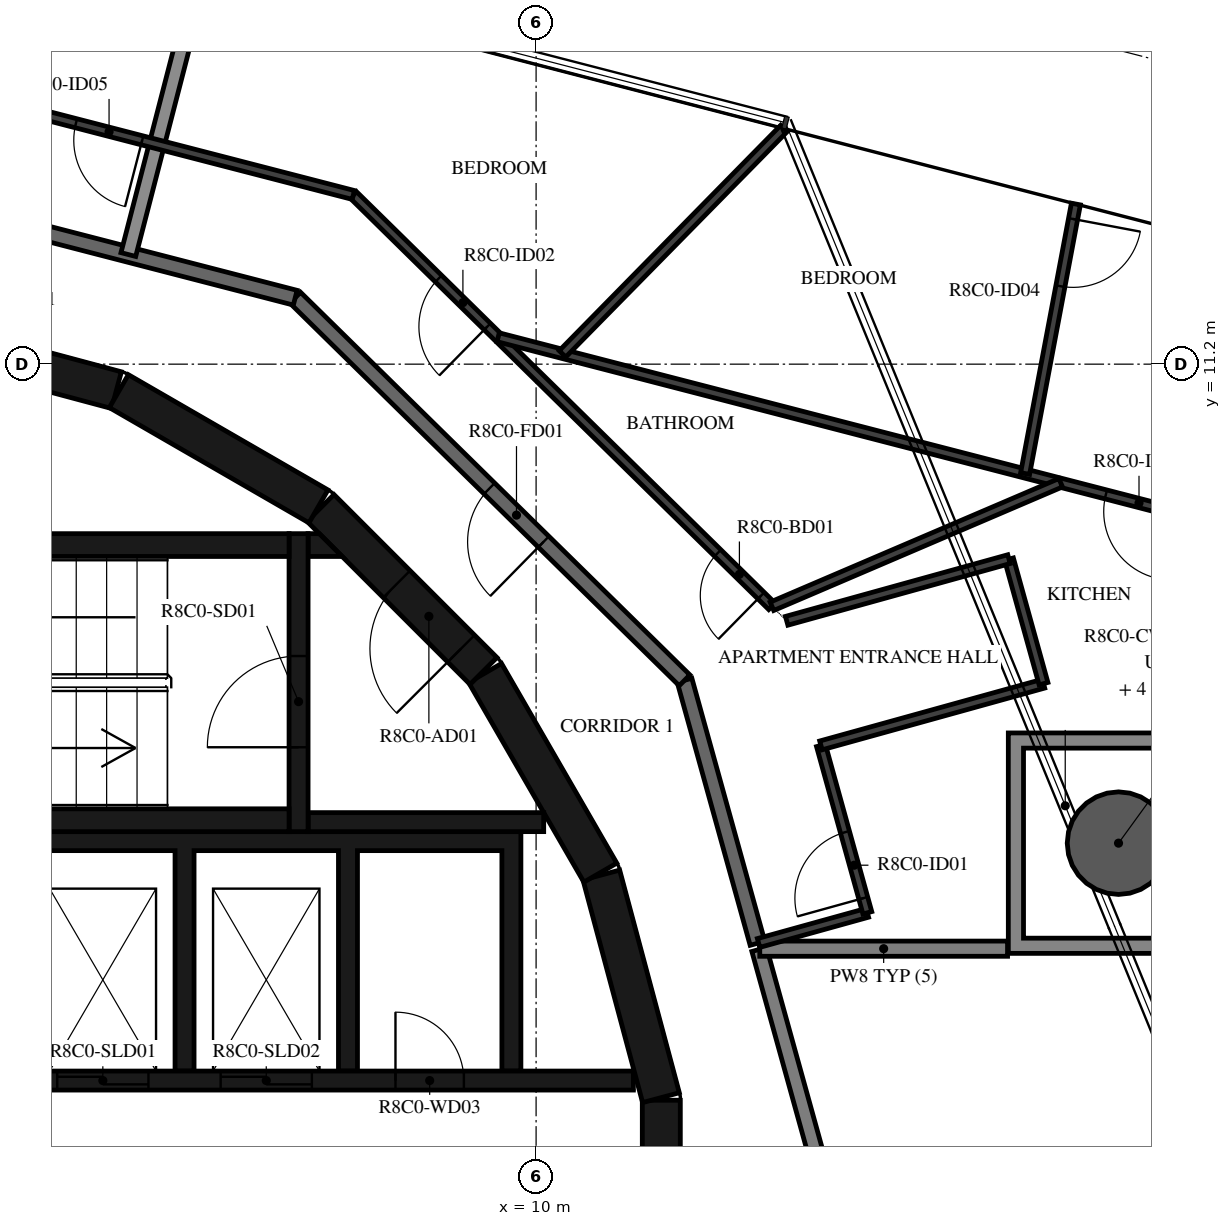
"""IFC4 building model, lengths in metres.
Left out: names, types, materials, properties, quantities, classifications, styles, units other than length and angle.
Written with IfcOpenShell. Run it as: python <this file> out.ifc"""

import sys

from ifc_helpers import new_model, si_unit, direction, frame, frame_2d, origin, origin_2d, place, context, subcontext, project, spatial, polyline, rectangle, hollow_circle, outline, extrude, element, fill, save


model = new_model("IFC4")
c1 = context("Model", 3, precision=1e-05, world=origin(), true_north=direction((0.0, 1.0)))
c2 = subcontext(c1, "Body", "Model", "MODEL_VIEW")
j1 = project(units=[si_unit("LENGTHUNIT", "METRE"), si_unit("PLANEANGLEUNIT", "RADIAN")], contexts=[c1])
p1 = place(None, origin())
s1 = spatial("IfcSite", under=j1, at=p1, CompositionType="ELEMENT")
p2 = place(p1, origin())
s2 = spatial("IfcBuilding", under=s1, at=p2, CompositionType="ELEMENT")
p3 = place(p2, frame((0.0, 0.0, 319.2)))
s3 = spatial("IfcBuildingStorey", under=s2, at=p3, CompositionType="ELEMENT", Elevation=319.2)
p4 = place(p3, frame((17.663, 4.898, -0.38), z_axis=(0.0, 0.0, 1.0), x_axis=(1.0, 0.0, 0.0)))
e1 = element("IfcColumn", 1, at=p4, inside=s3, PredefinedType="COLUMN", context=c2, shape_type="SweptSolid", body=[
    extrude(hollow_circle(Radius=0.675, WallThickness=0.03, at=origin_2d()), origin(), (0.0, 0.0, 1.0), 3.5),
])
p5 = place(p3, frame((11.647, -1.516, 0.0), z_axis=(0.0, 0.0, 1.0), x_axis=(0.0, 1.0, 0.0)))
e2 = element("IfcWall", 2, at=p5, inside=s3, PredefinedType="SHEAR", context=c2, shape_type="SweptSolid", body=[
    extrude(rectangle(XDim=3.033, YDim=0.5, at=frame_2d((1.516, 0.0))), origin(), (0.0, 0.0, 1.0), 3.12),
])
p6 = place(p5, frame((0.616, 0.0, 0.0)))
e3 = element("IfcOpeningElement", 3, at=p6, cuts=e2, PredefinedType="OPENING", context=c2, shape_type="SweptSolid", body=[
    extrude(rectangle(XDim=1.8, YDim=2.1, at=frame_2d((0.9, 1.05))), frame((0.0, 0.26, 0.0), z_axis=(0.0, -1.0, 0.0), x_axis=(1.0, 0.0, 0.0)), (0.0, 0.0, 1.0), 0.52),
])
for number, where, z_axis, x_axis in (
    (4, (11.643, 1.55, 0.0), (0.0, 0.0, 1.0), (-0.259, 0.966, 0.0)),
    (5, (10.845, 4.51, 0.0), (0.0, 0.0, 1.0), (-0.5, 0.866, 0.0)),
):
    element("IfcWall", number, at=place(p3, frame(where, z_axis=z_axis, x_axis=x_axis)), inside=s3, PredefinedType="SHEAR", context=c2, shape_type="SweptSolid", body=[
        extrude(rectangle(XDim=3.033, YDim=0.5, at=frame_2d((1.516, 0.0))), origin(), (0.0, 0.0, 1.0), 3.12),
    ])
p7 = place(p3, frame((9.308, 7.164, 0.0), z_axis=(0.0, 0.0, 1.0), x_axis=(-0.707106781187, 0.707106781187, 0.0)))
e6 = element("IfcWall", 6, at=p7, inside=s3, PredefinedType="SHEAR", context=c2, shape_type="SweptSolid", body=[
    extrude(rectangle(XDim=3.032, YDim=0.5, at=frame_2d((1.516, 0.0))), origin(), (0.0, 0.0, 1.0), 3.12),
])
p8 = place(p7, frame((0.416, 0.0, 0.0)))
e7 = element("IfcOpeningElement", 7, at=p8, cuts=e6, PredefinedType="OPENING", context=c2, shape_type="SweptSolid", body=[
    extrude(rectangle(XDim=1.2, YDim=2.1, at=frame_2d((0.6, 1.05))), frame((0.0, 0.26, 0.0), z_axis=(0.0, -1.0, 0.0), x_axis=(1.0, 0.0, 0.0)), (0.0, 0.0, 1.0), 0.52),
])
p9 = place(p3, frame((7.137, 9.329, 0.0), z_axis=(0.0, 0.0, 1.0), x_axis=(-0.865975092491, 0.500087131594, 0.0)))
e8 = element("IfcWall", 8, at=p9, inside=s3, PredefinedType="SHEAR", context=c2, shape_type="SweptSolid", body=[
    extrude(rectangle(XDim=3.033, YDim=0.5, at=frame_2d((1.516, 0.0))), origin(), (0.0, 0.0, 1.0), 3.12),
])
p10 = place(p3, frame((4.479, 10.858, 0.0), z_axis=(0.0, 0.0, 1.0), x_axis=(-0.965948410781, 0.258734743916, 0.0)))
e9 = element("IfcWall", 9, at=p10, inside=s3, PredefinedType="SHEAR", context=c2, shape_type="SweptSolid", body=[
    extrude(rectangle(XDim=3.033, YDim=0.5, at=frame_2d((1.516, 0.0))), origin(), (0.0, 0.0, 1.0), 3.12),
])
p11 = place(p10, frame((1.066, 0.0, 0.0)))
e10 = element("IfcOpeningElement", 10, at=p11, cuts=e9, PredefinedType="OPENING", context=c2, shape_type="SweptSolid", body=[
    extrude(rectangle(XDim=0.9, YDim=2.1, at=frame_2d((0.45, 1.05))), frame((0.0, 0.26, 0.0), z_axis=(0.0, -1.0, 0.0), x_axis=(1.0, 0.0, 0.0)), (0.0, 0.0, 1.0), 0.52),
])
for number, where, z_axis, x_axis in (
    (11, (0.0, 5.2, 0.0), (0.0, 0.0, 1.0), (1.0, 0.0, 0.0)),
    (12, (0.0, 8.82, 0.0), (0.0, 0.0, 1.0), (1.0, 0.0, 0.0)),
):
    element("IfcWall", number, at=place(p3, frame(where, z_axis=z_axis, x_axis=x_axis)), inside=s3, PredefinedType="SHEAR", context=c2, shape_type="SweptSolid", body=[
        extrude(rectangle(XDim=6.75, YDim=0.3, at=frame_2d((3.375, 0.0))), origin(), (0.0, 0.0, 1.0), 3.12),
    ])
p12 = place(p3, frame((6.875, 5.05, 0.0), z_axis=(0.0, 0.0, 1.0), x_axis=(0.0, 1.0, 0.0)))
e13 = element("IfcWall", 13, at=p12, inside=s3, PredefinedType="SHEAR", context=c2, shape_type="SweptSolid", body=[
    extrude(rectangle(XDim=3.92, YDim=0.25, at=frame_2d((1.96, 0.0))), origin(), (0.0, 0.0, 1.0), 3.12),
])
p13 = place(p12, frame((1.11, 0.0, 0.0)))
e14 = element("IfcOpeningElement", 14, at=p13, cuts=e13, PredefinedType="OPENING", context=c2, shape_type="SweptSolid", body=[
    extrude(rectangle(XDim=1.2, YDim=2.1, at=frame_2d((0.6, 1.05))), frame((0.0, 0.135, 0.0), z_axis=(0.0, -1.0, 0.0), x_axis=(1.0, 0.0, 0.0)), (0.0, 0.0, 1.0), 0.27),
])
p14 = place(p3, frame((7.0, 5.175, 0.0), z_axis=(0.0, 0.0, 1.0), x_axis=(1.0, 0.0, 0.0)))
e15 = element("IfcWall", 15, at=p14, inside=s3, PredefinedType="SHEAR", context=c2, shape_type="SweptSolid", body=[
    extrude(rectangle(XDim=3.1, YDim=0.25, at=frame_2d((1.55, 0.0))), origin(), (0.0, 0.0, 1.0), 3.12),
])
p15 = place(p3, origin())
e16 = element("IfcWall", 16, at=p15, inside=s3, PredefinedType="SHEAR", context=c2, shape_type="SweptSolid", body=[
    extrude(outline(polyline([(7.448, 8.67), (7.0, 8.67), (7.0, 8.97), (7.148, 8.97), (7.448, 8.67)])), origin(), (0.0, 0.0, 1.0), 3.12),
])
p16 = place(p3, origin())
e17 = element("IfcWall", 17, at=p16, inside=s3, PredefinedType="SHEAR", context=c2, shape_type="SweptSolid", body=[
    extrude(outline(polyline([(-9.8, 1.9), (-9.55, 1.9), (-9.55, 4.8), (-5.5, 4.8), (-5.5, 1.9), (-5.25, 1.9), (-5.25, 4.8), (3.1, 4.8), (3.1, 1.9), (3.35, 1.9), (3.35, 4.8), (5.25, 4.8), (5.25, 1.9), (5.5, 1.9), (5.5, 4.8), (7.4, 4.8), (7.4, 1.9), (7.65, 1.9), (7.65, 4.8), (9.55, 4.8), (9.55, 1.9), (9.8, 1.9), (9.8, 4.8), (9.8, 5.05), (-9.8, 5.05), (-9.8, 4.8), (-9.8, 1.9)])), origin(), (0.0, 0.0, 1.0), 3.12),
])
p17 = place(p3, frame((3.35, 1.775, 0.0), z_axis=(0.0, 0.0, 1.0), x_axis=(1.0, 0.0, 0.0)))
e18 = element("IfcWall", 18, at=p17, inside=s3, PredefinedType="SHEAR", context=c2, shape_type="SweptSolid", body=[
    extrude(rectangle(XDim=7.93, YDim=0.25, at=frame_2d((3.965, 0.0))), origin(), (0.0, 0.0, 1.0), 3.12),
])
p18 = place(p17, frame((0.35, 0.0, 0.0)))
e19 = element("IfcOpeningElement", 19, at=p18, cuts=e18, PredefinedType="OPENING", context=c2, shape_type="SweptSolid", body=[
    extrude(rectangle(XDim=1.2, YDim=2.4, at=frame_2d((0.6, 1.2))), frame((0.0, 0.135, 0.0), z_axis=(0.0, -1.0, 0.0), x_axis=(1.0, 0.0, 0.0)), (0.0, 0.0, 1.0), 0.27),
])
p19 = place(p17, frame((2.5, 0.0, 0.0)))
e20 = element("IfcOpeningElement", 20, at=p19, cuts=e18, PredefinedType="OPENING", context=c2, shape_type="SweptSolid", body=[
    extrude(rectangle(XDim=1.2, YDim=2.4, at=frame_2d((0.6, 1.2))), frame((0.0, 0.135, 0.0), z_axis=(0.0, -1.0, 0.0), x_axis=(1.0, 0.0, 0.0)), (0.0, 0.0, 1.0), 0.27),
])
p20 = place(p17, frame((4.8, 0.0, 0.0)))
e21 = element("IfcOpeningElement", 21, at=p20, cuts=e18, PredefinedType="OPENING", context=c2, shape_type="SweptSolid", body=[
    extrude(rectangle(XDim=0.9, YDim=2.1, at=frame_2d((0.45, 1.05))), frame((0.0, 0.135, 0.0), z_axis=(0.0, -1.0, 0.0), x_axis=(1.0, 0.0, 0.0)), (0.0, 0.0, 1.0), 0.27),
])
p21 = place(p3, frame((13.872, 0.121, 0.0), z_axis=(0.0, 0.0, 1.0), x_axis=(-0.267291928416, 0.963615600228, 0.0)))
e22 = element("IfcWall", 22, at=p21, inside=s3, PredefinedType="STANDARD", context=c2, shape_type="SweptSolid", body=[
    extrude(rectangle(XDim=3.507, YDim=0.2, at=frame_2d((1.753, 0.0))), origin(), (0.0, 0.0, 1.0), 3.12),
])
p22 = place(p3, frame((12.913, 3.581, 0.0), z_axis=(0.0, 0.0, 1.0), x_axis=(-0.267223005422, 0.963634715737, 0.0)))
e23 = element("IfcWall", 23, at=p22, inside=s3, PredefinedType="STANDARD", context=c2, shape_type="SweptSolid", body=[
    extrude(rectangle(XDim=3.591, YDim=0.2, at=frame_2d((1.795, 0.0))), origin(), (0.0, 0.0, 1.0), 3.12),
])
p23 = place(p3, frame((11.953, 7.041, 0.0), z_axis=(0.0, 0.0, 1.0), x_axis=(-0.713250549143, 0.70090916255, 0.0)))
e24 = element("IfcWall", 24, at=p23, inside=s3, PredefinedType="STANDARD", context=c2, shape_type="SweptSolid", body=[
    extrude(rectangle(XDim=7.181, YDim=0.2, at=frame_2d((3.59, 0.0))), origin(), (0.0, 0.0, 1.0), 3.12),
])
p24 = place(p23, frame((2.6, 0.0, 0.0)))
e25 = element("IfcOpeningElement", 25, at=p24, cuts=e24, PredefinedType="OPENING", context=c2, shape_type="SweptSolid", body=[
    extrude(rectangle(XDim=1.0, YDim=2.1, at=frame_2d((0.5, 1.05))), frame((0.0, 0.11, 0.0), z_axis=(0.0, -1.0, 0.0), x_axis=(1.0, 0.0, 0.0)), (0.0, 0.0, 1.0), 0.22),
])
p25 = place(p3, frame((6.831, 12.074, 0.0), z_axis=(0.0, 0.0, 1.0), x_axis=(-0.968144780225, 0.250391063186, 0.0)))
e26 = element("IfcWall", 26, at=p25, inside=s3, PredefinedType="STANDARD", context=c2, shape_type="SweptSolid", body=[
    extrude(rectangle(XDim=7.181, YDim=0.2, at=frame_2d((3.591, 0.0))), origin(), (0.0, 0.0, 1.0), 3.12),
])
p26 = place(p3, frame((16.203, 3.51, 0.0), z_axis=(0.0, 0.0, 1.0), x_axis=(-1.0, 0.0, 0.0)))
e27 = element("IfcWall", 27, at=p26, inside=s3, PredefinedType="STANDARD", context=c2, shape_type="SweptSolid", body=[
    extrude(rectangle(XDim=3.26, YDim=0.2, at=frame_2d((1.63, 0.0))), origin(), (0.0, 0.0, 1.0), 3.12),
])
p27 = place(p3, frame((5.578, 16.287, 0.0), z_axis=(0.0, 0.0, 1.0), x_axis=(-0.250385965992, -0.968146098497, 0.0)))
e28 = element("IfcWall", 28, at=p27, inside=s3, PredefinedType="STANDARD", context=c2, shape_type="SweptSolid", body=[
    extrude(rectangle(XDim=3.765, YDim=0.2, at=frame_2d((1.882, 0.0))), origin(), (0.0, 0.0, 1.0), 2.73),
])
p28 = place(p3, frame((12.927, 3.585, 0.0), z_axis=(0.0, 0.0, 1.0), x_axis=(0.963616756608, 0.26728775951, 0.0)))
e29 = element("IfcWall", 29, at=p28, inside=s3, PredefinedType="PARTITIONING", context=c2, shape_type="SweptSolid", body=[
    extrude(rectangle(XDim=1.485, YDim=0.12, at=frame_2d((0.743, 0.0))), origin(), (0.0, 0.0, 1.0), 3.12),
])
p29 = place(p3, frame((14.358, 3.982, 0.0), z_axis=(0.0, 0.0, 1.0), x_axis=(-0.267263698345, 0.963623430364, 0.0)))
e30 = element("IfcWall", 30, at=p29, inside=s3, PredefinedType="PARTITIONING", context=c2, shape_type="SweptSolid", body=[
    extrude(rectangle(XDim=2.286, YDim=0.12, at=frame_2d((1.143, 0.0))), origin(), (0.0, 0.0, 1.0), 3.12),
])
p30 = place(p29, frame((0.2, 0.0, 0.0)))
e31 = element("IfcOpeningElement", 31, at=p30, cuts=e30, PredefinedType="OPENING", context=c2, shape_type="SweptSolid", body=[
    extrude(rectangle(XDim=0.9, YDim=2.1, at=frame_2d((0.45, 1.05))), frame((0.0, 0.07, 0.0), z_axis=(0.0, -1.0, 0.0), x_axis=(1.0, 0.0, 0.0)), (0.0, 0.0, 1.0), 0.14),
])
p31 = place(p3, frame((13.747, 6.184, 0.0), z_axis=(0.0, 0.0, 1.0), x_axis=(0.963620272151, 0.267275085073, 0.0)))
e32 = element("IfcWall", 32, at=p31, inside=s3, PredefinedType="PARTITIONING", context=c2, shape_type="SweptSolid", body=[
    extrude(rectangle(XDim=3.039, YDim=0.12, at=frame_2d((1.52, 0.0))), origin(), (0.0, 0.0, 1.0), 3.12),
])
p32 = place(p3, frame((16.676, 6.997, 0.0), z_axis=(0.0, 0.0, 1.0), x_axis=(-0.267258687102, 0.963624820233, 0.0)))
e33 = element("IfcWall", 33, at=p32, inside=s3, PredefinedType="PARTITIONING", context=c2, shape_type="SweptSolid", body=[
    extrude(rectangle(XDim=1.7, YDim=0.12, at=frame_2d((0.85, 0.0))), origin(), (0.0, 0.0, 1.0), 3.12),
])
p33 = place(p3, frame((16.221, 8.635, 0.0), z_axis=(0.0, 0.0, 1.0), x_axis=(-0.963616947452, -0.267287071484, 0.0)))
e34 = element("IfcWall", 34, at=p33, inside=s3, PredefinedType="PARTITIONING", context=c2, shape_type="SweptSolid", body=[
    extrude(rectangle(XDim=3.035, YDim=0.12, at=frame_2d((1.518, 0.0))), origin(), (0.0, 0.0, 1.0), 3.12),
])
p34 = place(p3, frame((13.103, 8.014, 0.0), z_axis=(0.0, 0.0, 1.0), x_axis=(-0.713261822754, 0.700897690253, 0.0)))
e35 = element("IfcWall", 35, at=p34, inside=s3, PredefinedType="PARTITIONING", context=c2, shape_type="SweptSolid", body=[
    extrude(rectangle(XDim=7.721, YDim=0.12, at=frame_2d((3.86, 0.0))), origin(), (0.0, 0.0, 1.0), 3.12),
])
p35 = place(p34, frame((0.2, 0.0, 0.0)))
e36 = element("IfcOpeningElement", 36, at=p35, cuts=e35, PredefinedType="OPENING", context=c2, shape_type="SweptSolid", body=[
    extrude(rectangle(XDim=0.8, YDim=2.1, at=frame_2d((0.4, 1.05))), frame((0.0, 0.07, 0.0), z_axis=(0.0, -1.0, 0.0), x_axis=(1.0, 0.0, 0.0)), (0.0, 0.0, 1.0), 0.14),
])
p36 = place(p34, frame((5.25, 0.0, 0.0)))
e37 = element("IfcOpeningElement", 37, at=p36, cuts=e35, PredefinedType="OPENING", context=c2, shape_type="SweptSolid", body=[
    extrude(rectangle(XDim=0.9, YDim=2.1, at=frame_2d((0.45, 1.05))), frame((0.0, 0.07, 0.0), z_axis=(0.0, -1.0, 0.0), x_axis=(1.0, 0.0, 0.0)), (0.0, 0.0, 1.0), 0.14),
])
p37 = place(p3, frame((7.596, 13.426, 0.0), z_axis=(0.0, 0.0, 1.0), x_axis=(-0.968146656033, 0.250383810203, 0.0)))
e38 = element("IfcWall", 38, at=p37, inside=s3, PredefinedType="PARTITIONING", context=c2, shape_type="SweptSolid", body=[
    extrude(rectangle(XDim=7.985, YDim=0.12, at=frame_2d((3.992, 0.0))), origin(), (0.0, 0.0, 1.0), 3.12),
])
p38 = place(p37, frame((2.87, 0.0, 0.0)))
e39 = element("IfcOpeningElement", 39, at=p38, cuts=e38, PredefinedType="OPENING", context=c2, shape_type="SweptSolid", body=[
    extrude(rectangle(XDim=0.9, YDim=2.1, at=frame_2d((0.45, 1.05))), frame((0.0, 0.07, 0.0), z_axis=(0.0, -1.0, 0.0), x_axis=(1.0, 0.0, 0.0)), (0.0, 0.0, 1.0), 0.14),
])
p39 = place(p3, frame((18.561, 9.211, 0.0), z_axis=(0.0, 0.0, 1.0), x_axis=(-0.968146475492, 0.250384508293, 0.0)))
e40 = element("IfcWall", 40, at=p39, inside=s3, PredefinedType="PARTITIONING", context=c2, shape_type="SweptSolid", body=[
    extrude(rectangle(XDim=9.359, YDim=0.12, at=frame_2d((4.679, 0.0))), origin(), (0.0, 0.0, 1.0), 3.12),
])
p40 = place(p39, frame((0.2, 0.0, 0.0)))
e41 = element("IfcOpeningElement", 41, at=p40, cuts=e40, PredefinedType="OPENING", context=c2, shape_type="SweptSolid", body=[
    extrude(rectangle(XDim=0.9, YDim=2.1, at=frame_2d((0.45, 1.05))), frame((0.0, 0.07, 0.0), z_axis=(0.0, -1.0, 0.0), x_axis=(1.0, 0.0, 0.0)), (0.0, 0.0, 1.0), 0.14),
])
p41 = place(p3, frame((16.902, 9.64, 0.0), z_axis=(0.0, 0.0, 1.0), x_axis=(-0.919371033545, -0.393391538647, 0.0)))
e42 = element("IfcWall", 42, at=p41, inside=s3, PredefinedType="PARTITIONING", context=c2, shape_type="SweptSolid", body=[
    extrude(rectangle(XDim=4.132, YDim=0.12, at=frame_2d((2.066, 0.0))), origin(), (0.0, 0.0, 1.0), 3.12),
])
p42 = place(p3, frame((17.102, 13.307, 0.0), z_axis=(0.0, 0.0, 1.0), x_axis=(-0.185134164105, -0.982713254862, 0.0)))
e43 = element("IfcWall", 43, at=p42, inside=s3, PredefinedType="PARTITIONING", context=c2, shape_type="SweptSolid", body=[
    extrude(rectangle(XDim=3.608, YDim=0.12, at=frame_2d((1.804, 0.0))), origin(), (0.0, 0.0, 1.0), 3.12),
])
p43 = place(p42, frame((0.2, 0.0, 0.0)))
e44 = element("IfcOpeningElement", 44, at=p43, cuts=e43, PredefinedType="OPENING", context=c2, shape_type="SweptSolid", body=[
    extrude(rectangle(XDim=0.9, YDim=2.1, at=frame_2d((0.45, 1.05))), frame((0.0, 0.07, 0.0), z_axis=(0.0, -1.0, 0.0), x_axis=(1.0, 0.0, 0.0)), (0.0, 0.0, 1.0), 0.14),
])
p44 = place(p3, frame((13.26, 14.3, 0.0), z_axis=(0.0, 0.0, 1.0), x_axis=(-0.700942858884, -0.713217434293, 0.0)))
e45 = element("IfcWall", 45, at=p44, inside=s3, PredefinedType="PARTITIONING", context=c2, shape_type="SweptSolid", body=[
    extrude(rectangle(XDim=4.157, YDim=0.12, at=frame_2d((2.079, 0.0))), origin(), (0.0, 0.0, 1.0), 3.12),
])
p45 = place(p3, origin())
e46 = element("IfcWall", 46, at=p45, inside=s3, PredefinedType="STANDARD", context=c2, shape_type="SweptSolid", body=[
    extrude(outline(polyline([(19.113, 6.348), (19.113, 3.448), (16.213, 3.448), (16.213, 6.348), (19.113, 6.348)]), holes=[polyline([(16.413, 3.648), (18.913, 3.648), (18.913, 6.148), (16.413, 6.148), (16.413, 3.648)])]), origin(), (0.0, 0.0, 1.0), 3.12),
])
p46 = place(p13, origin())
e47 = element("IfcDoor", 47, at=p46, inside=s3, OperationType="SINGLE_SWING_LEFT", PredefinedType="DOOR", context=c2, shape_type="SweptSolid", body=[
    extrude(rectangle(XDim=1.2, YDim=2.1, at=frame_2d((0.6, 1.05))), frame((0.0, 0.025, 0.0), z_axis=(0.0, -1.0, 0.0), x_axis=(1.0, 0.0, 0.0)), (0.0, 0.0, 1.0), 0.05),
])
fill(e14, e47)
p47 = place(p8, origin())
e48 = element("IfcDoor", 48, at=p47, inside=s3, OperationType="SINGLE_SWING_RIGHT", PredefinedType="DOOR", context=c2, shape_type="SweptSolid", body=[
    extrude(rectangle(XDim=1.2, YDim=2.1, at=frame_2d((0.6, 1.05))), frame((0.0, 0.025, 0.0), z_axis=(0.0, -1.0, 0.0), x_axis=(1.0, 0.0, 0.0)), (0.0, 0.0, 1.0), 0.05),
])
fill(e7, e48)
p48 = place(p18, origin())
e49 = element("IfcDoor", 49, at=p48, inside=s3, OperationType="DOUBLE_DOOR_SLIDING", PredefinedType="DOOR", context=c2, shape_type="SweptSolid", body=[
    extrude(rectangle(XDim=1.2, YDim=2.4, at=frame_2d((0.6, 1.2))), frame((0.0, 0.025, 0.0), z_axis=(0.0, -1.0, 0.0), x_axis=(1.0, 0.0, 0.0)), (0.0, 0.0, 1.0), 0.05),
])
fill(e19, e49)
p49 = place(p19, origin())
e50 = element("IfcDoor", 50, at=p49, inside=s3, OperationType="DOUBLE_DOOR_SLIDING", PredefinedType="DOOR", context=c2, shape_type="SweptSolid", body=[
    extrude(rectangle(XDim=1.2, YDim=2.4, at=frame_2d((0.6, 1.2))), frame((0.0, 0.025, 0.0), z_axis=(0.0, -1.0, 0.0), x_axis=(1.0, 0.0, 0.0)), (0.0, 0.0, 1.0), 0.05),
])
fill(e20, e50)
p50 = place(p20, origin())
e51 = element("IfcDoor", 51, at=p50, inside=s3, OperationType="SINGLE_SWING_LEFT", PredefinedType="DOOR", context=c2, shape_type="SweptSolid", body=[
    extrude(rectangle(XDim=0.9, YDim=2.1, at=frame_2d((0.45, 1.05))), frame((0.0, 0.025, 0.0), z_axis=(0.0, -1.0, 0.0), x_axis=(1.0, 0.0, 0.0)), (0.0, 0.0, 1.0), 0.05),
])
fill(e21, e51)
p51 = place(p24, origin())
e52 = element("IfcDoor", 52, at=p51, inside=s3, OperationType="SINGLE_SWING_LEFT", PredefinedType="DOOR", context=c2, shape_type="SweptSolid", body=[
    extrude(rectangle(XDim=1.0, YDim=2.1, at=frame_2d((0.5, 1.05))), frame((0.0, 0.025, 0.0), z_axis=(0.0, -1.0, 0.0), x_axis=(1.0, 0.0, 0.0)), (0.0, 0.0, 1.0), 0.05),
])
fill(e25, e52)
p52 = place(p30, origin())
e53 = element("IfcDoor", 53, at=p52, inside=s3, OperationType="SINGLE_SWING_LEFT", PredefinedType="DOOR", context=c2, shape_type="SweptSolid", body=[
    extrude(rectangle(XDim=0.9, YDim=2.1, at=frame_2d((0.45, 1.05))), frame((0.0, 0.025, 0.0), z_axis=(0.0, -1.0, 0.0), x_axis=(1.0, 0.0, 0.0)), (0.0, 0.0, 1.0), 0.05),
])
fill(e31, e53)
p53 = place(p35, origin())
e54 = element("IfcDoor", 54, at=p53, inside=s3, OperationType="SINGLE_SWING_LEFT", PredefinedType="DOOR", context=c2, shape_type="SweptSolid", body=[
    extrude(rectangle(XDim=0.8, YDim=2.1, at=frame_2d((0.4, 1.05))), frame((0.0, 0.025, 0.0), z_axis=(0.0, -1.0, 0.0), x_axis=(1.0, 0.0, 0.0)), (0.0, 0.0, 1.0), 0.05),
])
fill(e36, e54)
p54 = place(p36, origin())
e55 = element("IfcDoor", 55, at=p54, inside=s3, OperationType="SINGLE_SWING_LEFT", PredefinedType="DOOR", context=c2, shape_type="SweptSolid", body=[
    extrude(rectangle(XDim=0.9, YDim=2.1, at=frame_2d((0.45, 1.05))), frame((0.0, 0.025, 0.0), z_axis=(0.0, -1.0, 0.0), x_axis=(1.0, 0.0, 0.0)), (0.0, 0.0, 1.0), 0.05),
])
fill(e37, e55)
p55 = place(p40, origin())
e56 = element("IfcDoor", 56, at=p55, inside=s3, OperationType="SINGLE_SWING_LEFT", PredefinedType="DOOR", context=c2, shape_type="SweptSolid", body=[
    extrude(rectangle(XDim=0.9, YDim=2.1, at=frame_2d((0.45, 1.05))), frame((0.0, 0.025, 0.0), z_axis=(0.0, -1.0, 0.0), x_axis=(1.0, 0.0, 0.0)), (0.0, 0.0, 1.0), 0.05),
])
fill(e41, e56)
p56 = place(p43, origin())
e57 = element("IfcDoor", 57, at=p56, inside=s3, OperationType="SINGLE_SWING_RIGHT", PredefinedType="DOOR", context=c2, shape_type="SweptSolid", body=[
    extrude(rectangle(XDim=0.9, YDim=2.1, at=frame_2d((0.45, 1.05))), frame((0.0, 0.025, 0.0), z_axis=(0.0, -1.0, 0.0), x_axis=(1.0, 0.0, 0.0)), (0.0, 0.0, 1.0), 0.05),
])
fill(e44, e57)
p57 = place(p38, origin())
e58 = element("IfcDoor", 58, at=p57, inside=s3, OperationType="SINGLE_SWING_LEFT", PredefinedType="DOOR", context=c2, shape_type="SweptSolid", body=[
    extrude(rectangle(XDim=0.9, YDim=2.1, at=frame_2d((0.45, 1.05))), frame((0.0, 0.025, 0.0), z_axis=(0.0, -1.0, 0.0), x_axis=(1.0, 0.0, 0.0)), (0.0, 0.0, 1.0), 0.05),
])
fill(e39, e58)
save(model, sys.argv[1])
